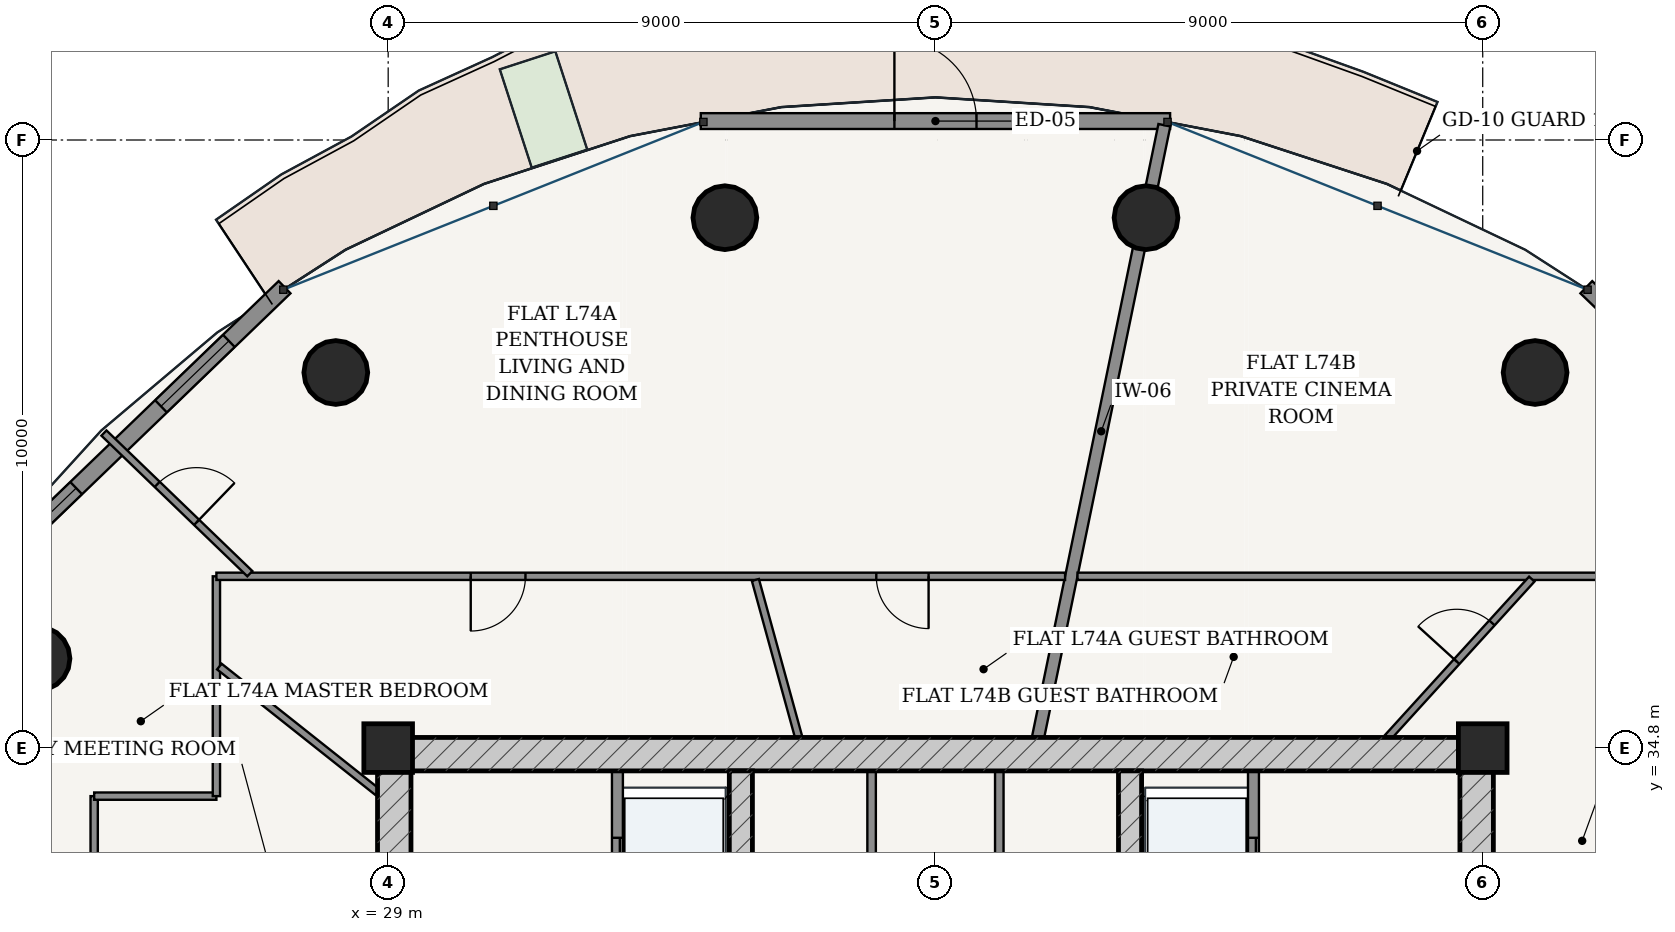
"""IFC4 building model, lengths in metres.
Left out: names, types, materials, properties, quantities, classifications, styles, units other than length and angle.
Written with IfcOpenShell. Run it as: python <this file> out.ifc"""

import sys

from ifc_helpers import new_model, si_unit, direction, frame, frame_2d, origin, origin_2d, place, context, subcontext, project, spatial, rectangle, hollow_circle, extrude, source, transform, mapped, element, fill, save


model = new_model("IFC4")
c1 = context("Model", 3, precision=1e-05, world=origin(), true_north=direction((-0.2419218956, 0.970295726276)))
c2 = subcontext(c1, "Body", "Model", "MODEL_VIEW")
j1 = project(units=[si_unit("LENGTHUNIT", "METRE"), si_unit("PLANEANGLEUNIT", "RADIAN")], contexts=[c1])
p1 = place(None, origin())
s1 = spatial("IfcSite", under=j1, at=p1, CompositionType="ELEMENT")
p2 = place(p1, origin())
s2 = spatial("IfcBuilding", under=s1, at=p2, CompositionType="ELEMENT")
p3 = place(p2, frame((0.0, 0.0, 281.95)))
s3 = spatial("IfcBuildingStorey", under=s2, at=p3, CompositionType="ELEMENT", Elevation=281.95)
for number, where, z_axis, x_axis in (
    (1, (47.0, 34.8, 0.0), (0.0, 0.0, 1.0), (1.0, 0.0, 0.0)),
    (2, (29.0, 34.8, 0.0), (0.0, 0.0, 1.0), (1.0, 0.0, 0.0)),
):
    element("IfcColumn", number, at=place(p3, frame(where, z_axis=z_axis, x_axis=x_axis)), inside=s3, PredefinedType="COLUMN", context=c2, shape_type="SweptSolid", body=[
        extrude(rectangle(XDim=0.8, YDim=0.8, at=origin_2d()), origin(), (0.0, 0.0, 1.0), 3.75),
    ])
p4 = place(p3, frame((28.825, 34.7, 0.0), z_axis=(0.0, 0.0, 1.0), x_axis=(1.0, 0.0, 0.0)))
e3 = element("IfcWall", 3, at=p4, inside=s3, PredefinedType="SHEAR", context=c2, shape_type="SweptSolid", body=[
    extrude(rectangle(XDim=18.35, YDim=0.55, at=frame_2d((9.175, 0.0))), origin(), (0.0, 0.0, 1.0), 3.49),
])
p5 = place(p3, frame((29.1, 19.175, 0.0), z_axis=(0.0, 0.0, 1.0), x_axis=(0.0, 1.0, 0.0)))
e4 = element("IfcWall", 4, at=p5, inside=s3, PredefinedType="SHEAR", context=c2, shape_type="SweptSolid", body=[
    extrude(rectangle(XDim=15.25, YDim=0.55, at=frame_2d((7.625, 0.0))), origin(), (0.0, 0.0, 1.0), 3.49),
])
p6 = place(p5, frame((9.875, 0.0, 0.0)))
e5 = element("IfcOpeningElement", 5, at=p6, cuts=e4, PredefinedType="OPENING", context=c2, shape_type="SweptSolid", body=[
    extrude(rectangle(XDim=1.5, YDim=2.2, at=frame_2d((0.75, 1.1))), frame((0.0, 0.285, 0.0), z_axis=(0.0, -1.0, 0.0), x_axis=(1.0, 0.0, 0.0)), (0.0, 0.0, 1.0), 0.57),
])
p7 = place(p3, frame((46.9, 19.175, 0.0), z_axis=(0.0, 0.0, 1.0), x_axis=(0.0, 1.0, 0.0)))
e6 = element("IfcWall", 6, at=p7, inside=s3, PredefinedType="SHEAR", context=c2, shape_type="SweptSolid", body=[
    extrude(rectangle(XDim=15.25, YDim=0.55, at=frame_2d((7.625, 0.0))), origin(), (0.0, 0.0, 1.0), 3.49),
])
p8 = place(p7, frame((9.875, 0.0, 0.0)))
e7 = element("IfcOpeningElement", 7, at=p8, cuts=e6, PredefinedType="OPENING", context=c2, shape_type="SweptSolid", body=[
    extrude(rectangle(XDim=1.5, YDim=2.2, at=frame_2d((0.75, 1.1))), frame((0.0, 0.285, 0.0), z_axis=(0.0, -1.0, 0.0), x_axis=(1.0, 0.0, 0.0)), (0.0, 0.0, 1.0), 0.57),
])
p9 = place(p3, frame((34.8, 19.175, 0.0), z_axis=(0.0, 0.0, 1.0), x_axis=(0.0, 1.0, 0.0)))
e8 = element("IfcWall", 8, at=p9, inside=s3, PredefinedType="SHEAR", context=c2, shape_type="SweptSolid", body=[
    extrude(rectangle(XDim=15.25, YDim=0.38, at=frame_2d((7.625, 0.0))), origin(), (0.0, 0.0, 1.0), 3.49),
])
p10 = place(p9, frame((7.8, 0.0, 0.0)))
e9 = element("IfcOpeningElement", 9, at=p10, cuts=e8, PredefinedType="OPENING", context=c2, shape_type="SweptSolid", body=[
    extrude(rectangle(XDim=1.05, YDim=2.15, at=frame_2d((0.525, 1.075))), frame((0.0, 0.2, 0.0), z_axis=(0.0, -1.0, 0.0), x_axis=(1.0, 0.0, 0.0)), (0.0, 0.0, 1.0), 0.4),
])
p11 = place(p3, frame((41.2, 19.175, 0.0), z_axis=(0.0, 0.0, 1.0), x_axis=(0.0, 1.0, 0.0)))
e10 = element("IfcWall", 10, at=p11, inside=s3, PredefinedType="SHEAR", context=c2, shape_type="SweptSolid", body=[
    extrude(rectangle(XDim=15.25, YDim=0.38, at=frame_2d((7.625, 0.0))), origin(), (0.0, 0.0, 1.0), 3.49),
])
p12 = place(p11, frame((7.8, 0.0, 0.0)))
e11 = element("IfcOpeningElement", 11, at=p12, cuts=e10, PredefinedType="OPENING", context=c2, shape_type="SweptSolid", body=[
    extrude(rectangle(XDim=1.05, YDim=2.15, at=frame_2d((0.525, 1.075))), frame((0.0, 0.2, 0.0), z_axis=(0.0, -1.0, 0.0), x_axis=(1.0, 0.0, 0.0)), (0.0, 0.0, 1.0), 0.4),
])
for number, where, z_axis, x_axis in (
    (12, (47.861, 40.977, 0.0), (0.0, 0.0, 1.0), (1.0, 0.0, 0.0)),
    (13, (41.463, 43.522, 0.0), (0.0, 0.0, 1.0), (1.0, 0.0, 0.0)),
    (14, (34.537, 43.522, 0.0), (0.0, 0.0, 1.0), (1.0, 0.0, 0.0)),
    (15, (28.139, 40.977, 0.0), (0.0, 0.0, 1.0), (1.0, 0.0, 0.0)),
    (16, (23.241, 36.272, 0.0), (0.0, 0.0, 1.0), (1.0, 0.0, 0.0)),
):
    element("IfcColumn", number, at=place(p3, frame(where, z_axis=z_axis, x_axis=x_axis)), inside=s3, PredefinedType="COLUMN", context=c2, shape_type="SweptSolid", body=[
        extrude(hollow_circle(Radius=0.525, WallThickness=0.035, at=origin_2d()), origin(), (0.0, 0.0, 1.0), 3.75),
    ])
p13 = place(p3, frame((54.163, 37.117, 0.0), z_axis=(0.0, 0.0, 1.0), x_axis=(-0.719979309073, 0.693995529169, 0.0)))
e17 = element("IfcWall", 17, at=p13, inside=s3, PredefinedType="SOLIDWALL", context=c2, shape_type="SweptSolid", body=[
    extrude(rectangle(XDim=7.583, YDim=0.28, at=frame_2d((3.791, 0.0))), origin(), (0.0, 0.0, 1.0), 3.49),
])
p14 = place(p13, frame((1.272, 0.0, 0.85)))
e18 = element("IfcOpeningElement", 18, at=p14, cuts=e17, PredefinedType="OPENING", context=c2, shape_type="SweptSolid", body=[
    extrude(rectangle(XDim=1.55, YDim=1.95, at=frame_2d((0.775, 0.975))), frame((0.0, 0.15, 0.0), z_axis=(0.0, -1.0, 0.0), x_axis=(1.0, 0.0, 0.0)), (0.0, 0.0, 1.0), 0.3),
])
p15 = place(p13, frame((4.76, 0.0, 0.85)))
e19 = element("IfcOpeningElement", 19, at=p15, cuts=e17, PredefinedType="OPENING", context=c2, shape_type="SweptSolid", body=[
    extrude(rectangle(XDim=1.55, YDim=1.95, at=frame_2d((0.775, 0.975))), frame((0.0, 0.15, 0.0), z_axis=(0.0, -1.0, 0.0), x_axis=(1.0, 0.0, 0.0)), (0.0, 0.0, 1.0), 0.3),
])
p16 = place(p3, frame((41.859, 45.111, 0.0), z_axis=(0.0, 0.0, 1.0), x_axis=(-1.0, 0.0, 0.0)))
e20 = element("IfcWall", 20, at=p16, inside=s3, PredefinedType="SOLIDWALL", context=c2, shape_type="SweptSolid", body=[
    extrude(rectangle(XDim=7.718, YDim=0.26, at=frame_2d((3.859, 0.0))), origin(), (0.0, 0.0, 1.0), 3.49),
])
p17 = place(p16, frame((3.184, 0.0, 0.0)))
e21 = element("IfcOpeningElement", 21, at=p17, cuts=e20, PredefinedType="OPENING", context=c2, shape_type="SweptSolid", body=[
    extrude(rectangle(XDim=1.35, YDim=2.2, at=frame_2d((0.675, 1.1))), frame((0.0, 0.14, 0.0), z_axis=(0.0, -1.0, 0.0), x_axis=(1.0, 0.0, 0.0)), (0.0, 0.0, 1.0), 0.28),
])
p18 = place(p3, frame((27.296, 42.379, 0.0), z_axis=(0.0, 0.0, 1.0), x_axis=(-0.719979309073, -0.693995529169, 0.0)))
e22 = element("IfcWall", 22, at=p18, inside=s3, PredefinedType="SOLIDWALL", context=c2, shape_type="SweptSolid", body=[
    extrude(rectangle(XDim=7.583, YDim=0.28, at=frame_2d((3.791, 0.0))), origin(), (0.0, 0.0, 1.0), 3.49),
])
p19 = place(p18, frame((1.272, 0.0, 0.85)))
e23 = element("IfcOpeningElement", 23, at=p19, cuts=e22, PredefinedType="OPENING", context=c2, shape_type="SweptSolid", body=[
    extrude(rectangle(XDim=1.55, YDim=1.95, at=frame_2d((0.775, 0.975))), frame((0.0, 0.15, 0.0), z_axis=(0.0, -1.0, 0.0), x_axis=(1.0, 0.0, 0.0)), (0.0, 0.0, 1.0), 0.3),
])
p20 = place(p18, frame((4.76, 0.0, 0.85)))
e24 = element("IfcOpeningElement", 24, at=p20, cuts=e22, PredefinedType="OPENING", context=c2, shape_type="SweptSolid", body=[
    extrude(rectangle(XDim=1.55, YDim=1.95, at=frame_2d((0.775, 0.975))), frame((0.0, 0.15, 0.0), z_axis=(0.0, -1.0, 0.0), x_axis=(1.0, 0.0, 0.0)), (0.0, 0.0, 1.0), 0.3),
])
p21 = place(p3, frame((32.77, 28.52, 0.0), z_axis=(0.0, 0.0, 1.0), x_axis=(0.0, 1.0, 0.0)))
e25 = element("IfcWall", 25, at=p21, inside=s3, PredefinedType="PARTITIONING", context=c2, shape_type="SweptSolid", body=[
    extrude(rectangle(XDim=5.905, YDim=0.18, at=frame_2d((2.953, 0.0))), origin(), (0.0, 0.0, 1.0), 3.49),
])
p22 = place(p21, frame((3.655, 0.0, 0.0)))
e26 = element("IfcOpeningElement", 26, at=p22, cuts=e25, PredefinedType="OPENING", context=c2, shape_type="SweptSolid", body=[
    extrude(rectangle(XDim=1.15, YDim=2.2, at=frame_2d((0.575, 1.1))), frame((0.0, 0.1, 0.0), z_axis=(0.0, -1.0, 0.0), x_axis=(1.0, 0.0, 0.0)), (0.0, 0.0, 1.0), 0.2),
])
p23 = place(p21, frame((0.73, 0.0, 0.0)))
e27 = element("IfcOpeningElement", 27, at=p23, cuts=e25, PredefinedType="OPENING", context=c2, shape_type="SweptSolid", body=[
    extrude(rectangle(XDim=1.2, YDim=2.25, at=frame_2d((0.6, 1.125))), frame((0.0, 0.1, 0.0), z_axis=(0.0, -1.0, 0.0), x_axis=(1.0, 0.0, 0.0)), (0.0, 0.0, 1.0), 0.2),
])
p24 = place(p3, frame((43.23, 28.52, 0.0), z_axis=(0.0, 0.0, 1.0), x_axis=(0.0, 1.0, 0.0)))
e28 = element("IfcWall", 28, at=p24, inside=s3, PredefinedType="PARTITIONING", context=c2, shape_type="SweptSolid", body=[
    extrude(rectangle(XDim=5.905, YDim=0.18, at=frame_2d((2.953, 0.0))), origin(), (0.0, 0.0, 1.0), 3.49),
])
p25 = place(p24, frame((0.905, 0.0, 0.0)))
e29 = element("IfcOpeningElement", 29, at=p25, cuts=e28, PredefinedType="OPENING", context=c2, shape_type="SweptSolid", body=[
    extrude(rectangle(XDim=0.85, YDim=2.1, at=frame_2d((0.425, 1.05))), frame((0.0, 0.1, 0.0), z_axis=(0.0, -1.0, 0.0), x_axis=(1.0, 0.0, 0.0)), (0.0, 0.0, 1.0), 0.2),
])
p26 = place(p24, frame((3.655, 0.0, 0.0)))
e30 = element("IfcOpeningElement", 30, at=p26, cuts=e28, PredefinedType="OPENING", context=c2, shape_type="SweptSolid", body=[
    extrude(rectangle(XDim=1.15, YDim=2.2, at=frame_2d((0.575, 1.1))), frame((0.0, 0.1, 0.0), z_axis=(0.0, -1.0, 0.0), x_axis=(1.0, 0.0, 0.0)), (0.0, 0.0, 1.0), 0.2),
])
for number, where, z_axis, x_axis in (
    (31, (36.95, 28.56, 0.0), (0.0, 0.0, 1.0), (0.0, 1.0, 0.0)),
    (32, (39.05, 28.56, 0.0), (0.0, 0.0, 1.0), (0.0, 1.0, 0.0)),
):
    element("IfcWall", number, at=place(p3, frame(where, z_axis=z_axis, x_axis=x_axis)), inside=s3, PredefinedType="PARTITIONING", context=c2, shape_type="SweptSolid", body=[
        extrude(rectangle(XDim=5.865, YDim=0.14, at=frame_2d((2.933, 0.0))), origin(), (0.0, 0.0, 1.0), 3.49),
    ])
p27 = place(p3, frame((39.688, 34.977, 0.0), z_axis=(0.0, 0.0, 1.0), x_axis=(0.202091890364, 0.979366564596, 0.0)))
e33 = element("IfcWall", 33, at=p27, inside=s3, PredefinedType="PARTITIONING", context=c2, shape_type="SweptSolid", body=[
    extrude(rectangle(XDim=10.278, YDim=0.2, at=frame_2d((5.139, 0.0))), origin(), (0.0, 0.0, 1.0), 2.575),
])
p28 = place(p3, frame((24.165, 14.465, 0.0), z_axis=(0.0, 0.0, 1.0), x_axis=(0.0, 1.0, 0.0)))
e34 = element("IfcWall", 34, at=p28, inside=s3, PredefinedType="PARTITIONING", context=c2, shape_type="SweptSolid", body=[
    extrude(rectangle(XDim=19.545, YDim=0.12, at=frame_2d((9.772, 0.0))), origin(), (0.0, 0.0, 1.0), 3.015),
])
p29 = place(p28, frame((4.875, 0.0, 0.0)))
e35 = element("IfcOpeningElement", 35, at=p29, cuts=e34, PredefinedType="OPENING", context=c2, shape_type="SweptSolid", body=[
    extrude(rectangle(XDim=0.9, YDim=2.15, at=frame_2d((0.45, 1.075))), frame((0.0, 0.07, 0.0), z_axis=(0.0, -1.0, 0.0), x_axis=(1.0, 0.0, 0.0)), (0.0, 0.0, 1.0), 0.14),
])
p30 = place(p28, frame((16.61, 0.0, 0.0)))
e36 = element("IfcOpeningElement", 36, at=p30, cuts=e34, PredefinedType="OPENING", context=c2, shape_type="SweptSolid", body=[
    extrude(rectangle(XDim=0.9, YDim=2.15, at=frame_2d((0.45, 1.075))), frame((0.0, 0.07, 0.0), z_axis=(0.0, -1.0, 0.0), x_axis=(1.0, 0.0, 0.0)), (0.0, 0.0, 1.0), 0.14),
])
p31 = place(p3, frame((24.165, 34.01, 0.0), z_axis=(0.0, 0.0, 1.0), x_axis=(1.0, 0.0, 0.0)))
e37 = element("IfcWall", 37, at=p31, inside=s3, PredefinedType="PARTITIONING", context=c2, shape_type="SweptSolid", body=[
    extrude(rectangle(XDim=2.01, YDim=0.12, at=frame_2d((1.005, 0.0))), origin(), (0.0, 0.0, 1.0), 3.209),
])
p32 = place(p3, frame((26.175, 34.01, 0.0), z_axis=(0.0, 0.0, 1.0), x_axis=(0.0, 1.0, 0.0)))
e38 = element("IfcWall", 38, at=p32, inside=s3, PredefinedType="PARTITIONING", context=c2, shape_type="SweptSolid", body=[
    extrude(rectangle(XDim=3.615, YDim=0.12, at=frame_2d((1.808, 0.0))), origin(), (0.0, 0.0, 1.0), 3.015),
])
p33 = place(p3, frame((26.175, 37.625, 0.0), z_axis=(0.0, 0.0, 1.0), x_axis=(1.0, 0.0, 0.0)))
e39 = element("IfcWall", 39, at=p33, inside=s3, PredefinedType="PARTITIONING", context=c2, shape_type="SweptSolid", body=[
    extrude(rectangle(XDim=13.957, YDim=0.12, at=frame_2d((6.979, 0.0))), origin(), (0.0, 0.0, 1.0), 3.015),
])
p34 = place(p33, frame((10.852, 0.0, 0.0)))
e40 = element("IfcOpeningElement", 40, at=p34, cuts=e39, PredefinedType="OPENING", context=c2, shape_type="SweptSolid", body=[
    extrude(rectangle(XDim=0.86, YDim=2.15, at=frame_2d((0.43, 1.075))), frame((0.0, 0.07, 0.0), z_axis=(0.0, -1.0, 0.0), x_axis=(1.0, 0.0, 0.0)), (0.0, 0.0, 1.0), 0.14),
])
p35 = place(p33, frame((4.183, 0.0, 0.0)))
e41 = element("IfcOpeningElement", 41, at=p35, cuts=e39, PredefinedType="OPENING", context=c2, shape_type="SweptSolid", body=[
    extrude(rectangle(XDim=0.9, YDim=2.15, at=frame_2d((0.45, 1.075))), frame((0.0, 0.07, 0.0), z_axis=(0.0, -1.0, 0.0), x_axis=(1.0, 0.0, 0.0)), (0.0, 0.0, 1.0), 0.14),
])
p36 = place(p3, frame((26.725, 37.668, 0.0), z_axis=(0.0, 0.0, 1.0), x_axis=(-0.719954096891, 0.694021684366, 0.0)))
e42 = element("IfcWall", 42, at=p36, inside=s3, PredefinedType="PARTITIONING", context=c2, shape_type="SweptSolid", body=[
    extrude(rectangle(XDim=3.333, YDim=0.12, at=frame_2d((1.667, 0.0))), origin(), (0.0, 0.0, 1.0), 3.121),
])
p37 = place(p36, frame((1.216, 0.0, 0.0)))
e43 = element("IfcOpeningElement", 43, at=p37, cuts=e42, PredefinedType="OPENING", context=c2, shape_type="SweptSolid", body=[
    extrude(rectangle(XDim=0.9, YDim=2.15, at=frame_2d((0.45, 1.075))), frame((0.0, 0.07, 0.0), z_axis=(0.0, -1.0, 0.0), x_axis=(1.0, 0.0, 0.0)), (0.0, 0.0, 1.0), 0.14),
])
p38 = place(p3, frame((24.107, 32.347, 0.0), z_axis=(0.0, 0.0, 1.0), x_axis=(-0.928712556691, 0.370800467966, 0.0)))
e44 = element("IfcWall", 44, at=p38, inside=s3, PredefinedType="PARTITIONING", context=c2, shape_type="SweptSolid", body=[
    extrude(rectangle(XDim=4.28, YDim=0.12, at=frame_2d((2.14, 0.0))), origin(), (0.0, 0.0, 1.0), 3.121),
])
p39 = place(p38, frame((1.69, 0.0, 0.0)))
e45 = element("IfcOpeningElement", 45, at=p39, cuts=e44, PredefinedType="OPENING", context=c2, shape_type="SweptSolid", body=[
    extrude(rectangle(XDim=0.9, YDim=2.15, at=frame_2d((0.45, 1.075))), frame((0.0, 0.07, 0.0), z_axis=(0.0, -1.0, 0.0), x_axis=(1.0, 0.0, 0.0)), (0.0, 0.0, 1.0), 0.14),
])
p40 = place(p3, frame((35.751, 34.977, 0.0), z_axis=(0.0, 0.0, 1.0), x_axis=(-0.26521778697, 0.964188532122, 0.0)))
e46 = element("IfcWall", 46, at=p40, inside=s3, PredefinedType="PARTITIONING", context=c2, shape_type="SweptSolid", body=[
    extrude(rectangle(XDim=2.684, YDim=0.12, at=frame_2d((1.342, 0.0))), origin(), (0.0, 0.0, 1.0), 2.575),
])
p41 = place(p3, frame((28.825, 34.077, 0.0), z_axis=(0.0, 0.0, 1.0), x_axis=(-0.783444596274, 0.621461635637, 0.0)))
e47 = element("IfcWall", 47, at=p41, inside=s3, PredefinedType="PARTITIONING", context=c2, shape_type="SweptSolid", body=[
    extrude(rectangle(XDim=3.32, YDim=0.12, at=frame_2d((1.66, 0.0))), origin(), (0.0, 0.0, 1.0), 3.209),
])
p42 = place(p3, frame((40.336, 37.625, 0.0), z_axis=(0.0, 0.0, 1.0), x_axis=(1.0, 0.0, 0.0)))
e48 = element("IfcWall", 48, at=p42, inside=s3, PredefinedType="PARTITIONING", context=c2, shape_type="SweptSolid", body=[
    extrude(rectangle(XDim=9.489, YDim=0.12, at=frame_2d((4.745, 0.0))), origin(), (0.0, 0.0, 1.0), 3.015),
])
p43 = place(p3, frame((45.439, 34.977, 0.0), z_axis=(0.0, 0.0, 1.0), x_axis=(0.672980108938, 0.739660579573, 0.0)))
e49 = element("IfcWall", 49, at=p43, inside=s3, PredefinedType="PARTITIONING", context=c2, shape_type="SweptSolid", body=[
    extrude(rectangle(XDim=3.519, YDim=0.12, at=frame_2d((1.759, 0.0))), origin(), (0.0, 0.0, 1.0), 3.015),
])
p44 = place(p43, frame((1.685, 0.0, 0.0)))
e50 = element("IfcOpeningElement", 50, at=p44, cuts=e49, PredefinedType="OPENING", context=c2, shape_type="SweptSolid", body=[
    extrude(rectangle(XDim=0.86, YDim=2.15, at=frame_2d((0.43, 1.075))), frame((0.0, 0.07, 0.0), z_axis=(0.0, -1.0, 0.0), x_axis=(1.0, 0.0, 0.0)), (0.0, 0.0, 1.0), 0.14),
])
m1 = source(origin(), c2, "Body", "SweptSolid", [
    extrude(rectangle(XDim=1.35, YDim=2.2, at=frame_2d((0.675, 1.1))), frame((0.0, 0.025, 0.0), z_axis=(0.0, -1.0, 0.0), x_axis=(1.0, 0.0, 0.0)), (0.0, 0.0, 1.0), 0.05),
])
p45 = place(p17, frame((1.35, 0.0, 0.0), z_axis=(0.0, 0.0, 1.0), x_axis=(-1.0, 0.0, 0.0)))
e51 = element("IfcDoor", 51, at=p45, inside=s3, OperationType="SINGLE_SWING_LEFT", PredefinedType="DOOR", context=c2, shape_type="MappedRepresentation", body=[
    mapped(m1, transform((0.0, 0.0, 0.0), scale=1.0)),
])
fill(e21, e51)
m2 = source(origin(), c2, "Body", "SweptSolid", [
    extrude(rectangle(XDim=1.55, YDim=1.95, at=frame_2d((0.775, 0.975))), frame((0.0, 0.03, 0.0), z_axis=(0.0, -1.0, 0.0), x_axis=(1.0, 0.0, 0.0)), (0.0, 0.0, 1.0), 0.06),
])
p46 = place(p19, origin())
e52 = element("IfcWindow", 52, at=p46, inside=s3, PartitioningType="SINGLE_PANEL", PredefinedType="WINDOW", context=c2, shape_type="MappedRepresentation", body=[
    mapped(m2, transform((0.0, 0.0, 0.0), scale=1.0)),
])
fill(e23, e52)
p47 = place(p20, origin())
e53 = element("IfcWindow", 53, at=p47, inside=s3, PartitioningType="SINGLE_PANEL", PredefinedType="WINDOW", context=c2, shape_type="MappedRepresentation", body=[
    mapped(m2, transform((0.0, 0.0, 0.0), scale=1.0)),
])
fill(e24, e53)
m3 = source(origin(), c2, "Body", "SweptSolid", [
    extrude(rectangle(XDim=1.15, YDim=2.2, at=frame_2d((0.575, 1.1))), frame((0.0, 0.025, 0.0), z_axis=(0.0, -1.0, 0.0), x_axis=(1.0, 0.0, 0.0)), (0.0, 0.0, 1.0), 0.05),
])
p48 = place(p22, origin())
e54 = element("IfcDoor", 54, at=p48, inside=s3, OperationType="DOUBLE_DOOR_SLIDING", PredefinedType="DOOR", context=c2, shape_type="MappedRepresentation", body=[
    mapped(m3, transform((0.0, 0.0, 0.0), scale=1.0)),
])
fill(e26, e54)
p49 = place(p26, origin())
e55 = element("IfcDoor", 55, at=p49, inside=s3, OperationType="DOUBLE_DOOR_SLIDING", PredefinedType="DOOR", context=c2, shape_type="MappedRepresentation", body=[
    mapped(m3, transform((0.0, 0.0, 0.0), scale=1.0)),
])
fill(e30, e55)
m4 = source(origin(), c2, "Body", "SweptSolid", [
    extrude(rectangle(XDim=0.9, YDim=2.15, at=frame_2d((0.45, 1.075))), frame((0.0, 0.025, 0.0), z_axis=(0.0, -1.0, 0.0), x_axis=(1.0, 0.0, 0.0)), (0.0, 0.0, 1.0), 0.05),
])
p50 = place(p37, frame((0.9, 0.0, 0.0), z_axis=(0.0, 0.0, 1.0), x_axis=(-1.0, 0.0, 0.0)))
e56 = element("IfcDoor", 56, at=p50, inside=s3, OperationType="SINGLE_SWING_RIGHT", PredefinedType="DOOR", context=c2, shape_type="MappedRepresentation", body=[
    mapped(m4, transform((0.0, 0.0, 0.0), scale=1.0)),
])
fill(e43, e56)
m5 = source(origin(), c2, "Body", "SweptSolid", [
    extrude(rectangle(XDim=0.86, YDim=2.15, at=frame_2d((0.43, 1.075))), frame((0.0, 0.025, 0.0), z_axis=(0.0, -1.0, 0.0), x_axis=(1.0, 0.0, 0.0)), (0.0, 0.0, 1.0), 0.05),
])
p51 = place(p34, frame((0.86, 0.0, 0.0), z_axis=(0.0, 0.0, 1.0), x_axis=(-1.0, 0.0, 0.0)))
e57 = element("IfcDoor", 57, at=p51, inside=s3, OperationType="SINGLE_SWING_LEFT", PredefinedType="DOOR", context=c2, shape_type="MappedRepresentation", body=[
    mapped(m5, transform((0.0, 0.0, 0.0), scale=1.0)),
])
fill(e40, e57)
p52 = place(p35, frame((0.9, 0.0, 0.0), z_axis=(0.0, 0.0, 1.0), x_axis=(-1.0, 0.0, 0.0)))
e58 = element("IfcDoor", 58, at=p52, inside=s3, OperationType="SINGLE_SWING_RIGHT", PredefinedType="DOOR", context=c2, shape_type="MappedRepresentation", body=[
    mapped(m4, transform((0.0, 0.0, 0.0), scale=1.0)),
])
fill(e41, e58)
p53 = place(p44, origin())
e59 = element("IfcDoor", 59, at=p53, inside=s3, OperationType="SINGLE_SWING_LEFT", PredefinedType="DOOR", context=c2, shape_type="MappedRepresentation", body=[
    mapped(m5, transform((0.0, 0.0, 0.0), scale=1.0)),
])
fill(e50, e59)
save(model, sys.argv[1])
